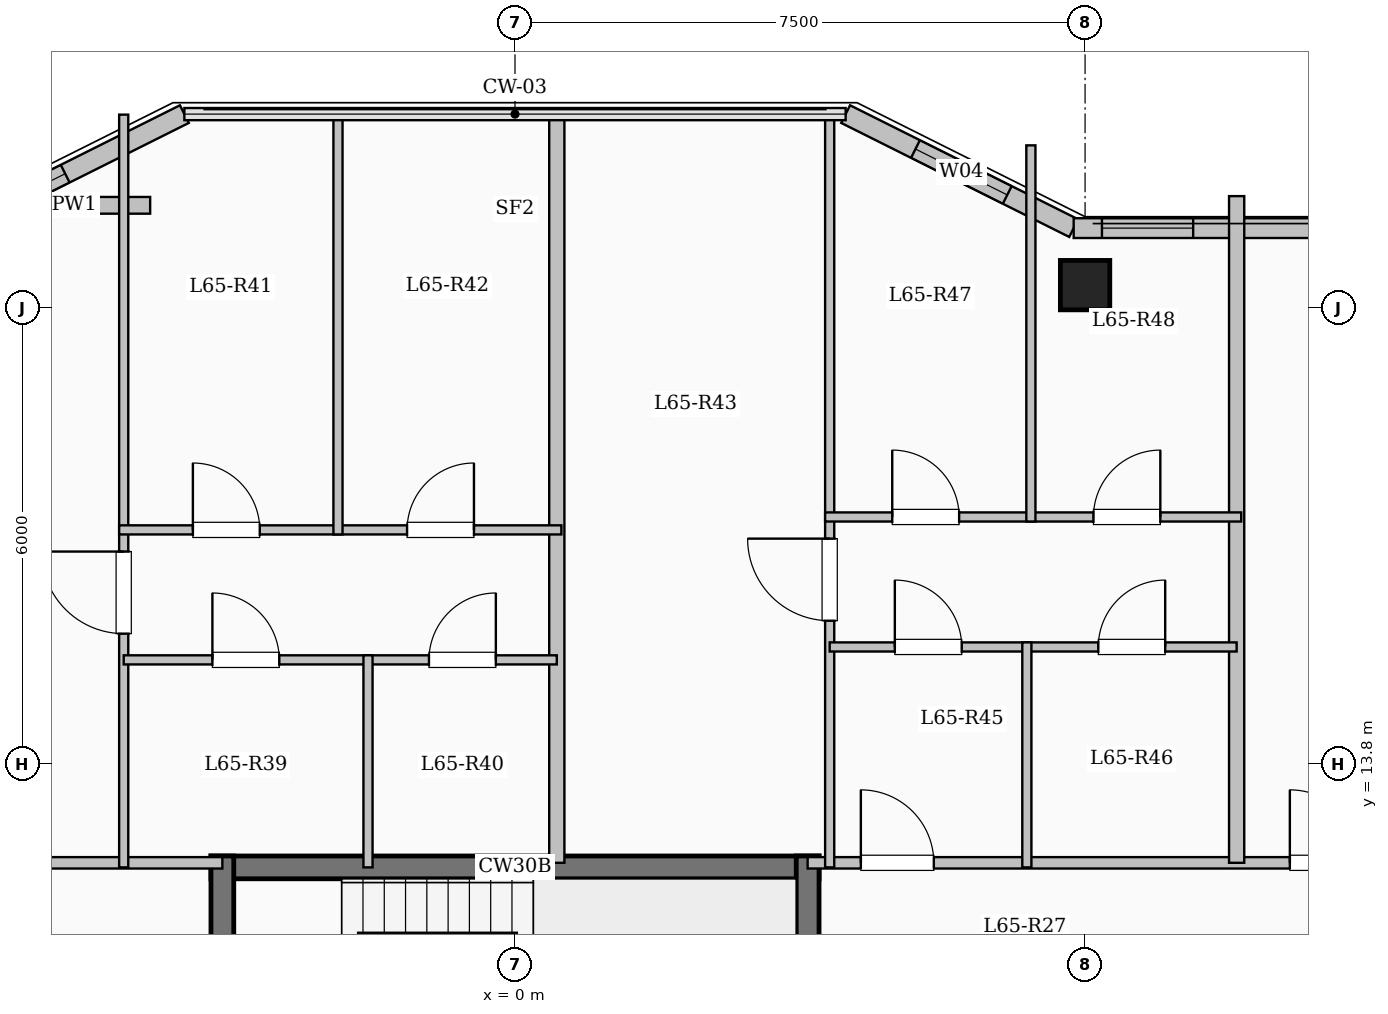
"""IFC4 building model, lengths in metres.
Left out: names, types, materials, properties, quantities, classifications, styles, units other than length and angle.
Written with IfcOpenShell. Run it as: python <this file> out.ifc"""

import sys

from ifc_helpers import new_model, si_unit, direction, frame, frame_2d, origin, origin_2d, place, context, subcontext, project, spatial, rectangle, extrude, element, fill, save


model = new_model("IFC4")
c1 = context("Model", 3, precision=1e-05, world=origin(), true_north=direction((0.0, 1.0)))
c2 = subcontext(c1, "Body", "Model", "MODEL_VIEW")
j1 = project(units=[si_unit("LENGTHUNIT", "METRE"), si_unit("PLANEANGLEUNIT", "RADIAN")], contexts=[c1])
p1 = place(None, origin())
s1 = spatial("IfcSite", under=j1, at=p1, CompositionType="ELEMENT")
p2 = place(p1, origin())
s2 = spatial("IfcBuilding", under=s1, at=p2, CompositionType="ELEMENT")
p3 = place(p2, frame((0.0, 0.0, 241.5)))
s3 = spatial("IfcBuildingStorey", under=s2, at=p3, CompositionType="ELEMENT", Elevation=241.5)
p4 = place(p3, frame((7.5, 20.1, 0.0), z_axis=(0.0, 0.0, 1.0), x_axis=(1.0, 0.0, 0.0)))
e1 = element("IfcColumn", 1, at=p4, inside=s3, PredefinedType="COLUMN", context=c2, shape_type="SweptSolid", body=[
    extrude(rectangle(XDim=0.65, YDim=0.65, at=origin_2d()), origin(), (0.0, 0.0, 1.0), 3.35),
])
p5 = place(p3, frame((-7.35, 20.85, 0.0), z_axis=(0.0, 0.0, 1.0), x_axis=(0.894427191, 0.4472135955, 0.0)))
e2 = element("IfcWall", 2, at=p5, inside=s3, PredefinedType="SOLIDWALL", context=c2, shape_type="SweptSolid", body=[
    extrude(rectangle(XDim=3.354, YDim=0.26, at=frame_2d((1.677, 0.0))), origin(), (0.0, 0.0, 1.0), 3.1),
])
p6 = place(p5, frame((0.401, 0.0, 0.95)))
e3 = element("IfcOpeningElement", 3, at=p6, cuts=e2, PredefinedType="OPENING", context=c2, shape_type="SweptSolid", body=[
    extrude(rectangle(XDim=1.2, YDim=1.5, at=frame_2d((0.6, 0.75))), frame((0.0, 0.14, 0.0), z_axis=(0.0, -1.0, 0.0), x_axis=(1.0, 0.0, 0.0)), (0.0, 0.0, 1.0), 0.28),
])
p7 = place(p3, frame((4.35, 22.35, 0.0), z_axis=(0.0, 0.0, 1.0), x_axis=(0.894427191, -0.4472135955, 0.0)))
e4 = element("IfcWall", 4, at=p7, inside=s3, PredefinedType="SOLIDWALL", context=c2, shape_type="SweptSolid", body=[
    extrude(rectangle(XDim=3.354, YDim=0.26, at=frame_2d((1.677, 0.0))), origin(), (0.0, 0.0, 1.0), 3.1),
])
p8 = place(p7, frame((1.027, 0.0, 0.95)))
e5 = element("IfcOpeningElement", 5, at=p8, cuts=e4, PredefinedType="OPENING", context=c2, shape_type="SweptSolid", body=[
    extrude(rectangle(XDim=1.35, YDim=1.55, at=frame_2d((0.675, 0.775))), frame((0.0, 0.14, 0.0), z_axis=(0.0, -1.0, 0.0), x_axis=(1.0, 0.0, 0.0)), (0.0, 0.0, 1.0), 0.28),
])
p9 = place(p3, frame((7.35, 20.85, 0.0), z_axis=(0.0, 0.0, 1.0), x_axis=(1.0, 0.0, 0.0)))
e6 = element("IfcWall", 6, at=p9, inside=s3, PredefinedType="SOLIDWALL", context=c2, shape_type="SweptSolid", body=[
    extrude(rectangle(XDim=10.5, YDim=0.26, at=frame_2d((5.25, 0.0))), origin(), (0.0, 0.0, 1.0), 3.1),
])
p10 = place(p9, frame((0.372, 0.0, 0.95)))
e7 = element("IfcOpeningElement", 7, at=p10, cuts=e6, PredefinedType="OPENING", context=c2, shape_type="SweptSolid", body=[
    extrude(rectangle(XDim=1.2, YDim=1.5, at=frame_2d((0.6, 0.75))), frame((0.0, 0.14, 0.0), z_axis=(0.0, -1.0, 0.0), x_axis=(1.0, 0.0, 0.0)), (0.0, 0.0, 1.0), 0.28),
])
p11 = place(p9, frame((3.1, 0.0, 0.9)))
e8 = element("IfcOpeningElement", 8, at=p11, cuts=e6, PredefinedType="OPENING", context=c2, shape_type="SweptSolid", body=[
    extrude(rectangle(XDim=2.2, YDim=1.75, at=frame_2d((1.1, 0.875))), frame((0.0, 0.14, 0.0), z_axis=(0.0, -1.0, 0.0), x_axis=(1.0, 0.0, 0.0)), (0.0, 0.0, 1.0), 0.28),
])
p12 = place(p9, frame((7.525, 0.0, 0.9)))
e9 = element("IfcOpeningElement", 9, at=p12, cuts=e6, PredefinedType="OPENING", context=c2, shape_type="SweptSolid", body=[
    extrude(rectangle(XDim=1.65, YDim=1.6, at=frame_2d((0.825, 0.8))), frame((0.0, 0.14, 0.0), z_axis=(0.0, -1.0, 0.0), x_axis=(1.0, 0.0, 0.0)), (0.0, 0.0, 1.0), 0.28),
])
p13 = place(p3, frame((-6.8, 21.15, 0.0), z_axis=(0.0, 0.0, 1.0), x_axis=(1.0, 0.0, 0.0)))
e10 = element("IfcWall", 10, at=p13, inside=s3, PredefinedType="PARAPET", context=c2, shape_type="SweptSolid", body=[
    extrude(rectangle(XDim=2.0, YDim=0.22, at=frame_2d((1.0, 0.0))), origin(), (0.0, 0.0, 1.0), 0.85),
])
p14 = place(p3, frame((-4.0, 12.44, 0.0), z_axis=(0.0, 0.0, 1.0), x_axis=(1.0, 0.0, 0.0)))
e11 = element("IfcWall", 11, at=p14, inside=s3, PredefinedType="SHEAR", context=c2, shape_type="SweptSolid", body=[
    extrude(rectangle(XDim=8.0, YDim=0.3, at=frame_2d((4.0, 0.0))), origin(), (0.0, 0.0, 1.0), 3.35),
])
for number, where, z_axis, x_axis in (
    (12, (-3.85, 9.0, 0.0), (0.0, 0.0, 1.0), (0.0, 1.0, 0.0)),
    (13, (3.85, 9.0, 0.0), (0.0, 0.0, 1.0), (0.0, 1.0, 0.0)),
):
    element("IfcWall", number, at=place(p3, frame(where, z_axis=z_axis, x_axis=x_axis)), inside=s3, PredefinedType="SHEAR", context=c2, shape_type="SweptSolid", body=[
        extrude(rectangle(XDim=3.59, YDim=0.3, at=frame_2d((1.795, 0.0))), origin(), (0.0, 0.0, 1.0), 3.35),
    ])
p15 = place(p3, frame((-17.75, 12.5, 0.0), z_axis=(0.0, 0.0, 1.0), x_axis=(1.0, 0.0, 0.0)))
e14 = element("IfcWall", 14, at=p15, inside=s3, PredefinedType="PARTITIONING", context=c2, shape_type="SweptSolid", body=[
    extrude(rectangle(XDim=13.9, YDim=0.15, at=frame_2d((6.95, 0.0))), origin(), (0.0, 0.0, 1.0), 3.1),
])
p16 = place(p15, frame((0.7, 0.0, 0.0)))
e15 = element("IfcOpeningElement", 15, at=p16, cuts=e14, PredefinedType="OPENING", context=c2, shape_type="SweptSolid", body=[
    extrude(rectangle(XDim=0.96, YDim=2.15, at=frame_2d((0.48, 1.075))), frame((0.0, 0.085, 0.0), z_axis=(0.0, -1.0, 0.0), x_axis=(1.0, 0.0, 0.0)), (0.0, 0.0, 1.0), 0.17),
])
p17 = place(p15, frame((9.484, 0.0, 0.0)))
e16 = element("IfcOpeningElement", 16, at=p17, cuts=e14, PredefinedType="OPENING", context=c2, shape_type="SweptSolid", body=[
    extrude(rectangle(XDim=0.96, YDim=2.15, at=frame_2d((0.48, 1.075))), frame((0.0, 0.085, 0.0), z_axis=(0.0, -1.0, 0.0), x_axis=(1.0, 0.0, 0.0)), (0.0, 0.0, 1.0), 0.17),
])
p18 = place(p3, frame((3.85, 12.5, 0.0), z_axis=(0.0, 0.0, 1.0), x_axis=(1.0, 0.0, 0.0)))
e17 = element("IfcWall", 17, at=p18, inside=s3, PredefinedType="PARTITIONING", context=c2, shape_type="SweptSolid", body=[
    extrude(rectangle(XDim=13.9, YDim=0.15, at=frame_2d((6.95, 0.0))), origin(), (0.0, 0.0, 1.0), 3.1),
])
p19 = place(p18, frame((0.7, 0.0, 0.0)))
e18 = element("IfcOpeningElement", 18, at=p19, cuts=e17, PredefinedType="OPENING", context=c2, shape_type="SweptSolid", body=[
    extrude(rectangle(XDim=0.96, YDim=2.15, at=frame_2d((0.48, 1.075))), frame((0.0, 0.085, 0.0), z_axis=(0.0, -1.0, 0.0), x_axis=(1.0, 0.0, 0.0)), (0.0, 0.0, 1.0), 0.17),
])
p20 = place(p18, frame((6.344, 0.0, 0.0)))
e19 = element("IfcOpeningElement", 19, at=p20, cuts=e17, PredefinedType="OPENING", context=c2, shape_type="SweptSolid", body=[
    extrude(rectangle(XDim=0.96, YDim=2.15, at=frame_2d((0.48, 1.075))), frame((0.0, 0.085, 0.0), z_axis=(0.0, -1.0, 0.0), x_axis=(1.0, 0.0, 0.0)), (0.0, 0.0, 1.0), 0.17),
])
p21 = place(p3, frame((0.55, 12.5, 0.0), z_axis=(0.0, 0.0, 1.0), x_axis=(0.0, 1.0, 0.0)))
e20 = element("IfcWall", 20, at=p21, inside=s3, PredefinedType="SOLIDWALL", context=c2, shape_type="SweptSolid", body=[
    extrude(rectangle(XDim=9.88, YDim=0.2, at=frame_2d((4.94, 0.0))), origin(), (0.0, 0.0, 1.0), 3.1),
])
p22 = place(p3, frame((-5.148, 12.44, 0.0), z_axis=(0.0, 0.0, 1.0), x_axis=(0.0, 1.0, 0.0)))
e21 = element("IfcWall", 21, at=p22, inside=s3, PredefinedType="PARTITIONING", context=c2, shape_type="SweptSolid", body=[
    extrude(rectangle(XDim=9.903, YDim=0.12, at=frame_2d((4.952, 0.0))), origin(), (0.0, 0.0, 1.0), 3.1),
])
p23 = place(p22, frame((3.075, 0.0, 0.0)))
e22 = element("IfcOpeningElement", 22, at=p23, cuts=e21, PredefinedType="OPENING", context=c2, shape_type="SweptSolid", body=[
    extrude(rectangle(XDim=1.08, YDim=2.15, at=frame_2d((0.54, 1.075))), frame((0.0, 0.07, 0.0), z_axis=(0.0, -1.0, 0.0), x_axis=(1.0, 0.0, 0.0)), (0.0, 0.0, 1.0), 0.14),
])
p24 = place(p3, frame((-5.148, 15.17, 0.0), z_axis=(0.0, 0.0, 1.0), x_axis=(1.0, 0.0, 0.0)))
e23 = element("IfcWall", 23, at=p24, inside=s3, PredefinedType="PARTITIONING", context=c2, shape_type="SweptSolid", body=[
    extrude(rectangle(XDim=3.214, YDim=0.12, at=frame_2d((1.607, 0.0))), origin(), (0.0, 0.0, 1.0), 3.1),
])
p25 = place(p24, frame((1.167, 0.0, 0.0)))
e24 = element("IfcOpeningElement", 24, at=p25, cuts=e23, PredefinedType="OPENING", context=c2, shape_type="SweptSolid", body=[
    extrude(rectangle(XDim=0.88, YDim=2.1, at=frame_2d((0.44, 1.05))), frame((0.0, 0.07, 0.0), z_axis=(0.0, -1.0, 0.0), x_axis=(1.0, 0.0, 0.0)), (0.0, 0.0, 1.0), 0.14),
])
p26 = place(p3, frame((-1.934, 15.17, 0.0), z_axis=(0.0, 0.0, 1.0), x_axis=(1.0, 0.0, 0.0)))
e25 = element("IfcWall", 25, at=p26, inside=s3, PredefinedType="PARTITIONING", context=c2, shape_type="SweptSolid", body=[
    extrude(rectangle(XDim=2.484, YDim=0.12, at=frame_2d((1.242, 0.0))), origin(), (0.0, 0.0, 1.0), 3.1),
])
p27 = place(p26, frame((0.802, 0.0, 0.0)))
e26 = element("IfcOpeningElement", 26, at=p27, cuts=e25, PredefinedType="OPENING", context=c2, shape_type="SweptSolid", body=[
    extrude(rectangle(XDim=0.88, YDim=2.1, at=frame_2d((0.44, 1.05))), frame((0.0, 0.07, 0.0), z_axis=(0.0, -1.0, 0.0), x_axis=(1.0, 0.0, 0.0)), (0.0, 0.0, 1.0), 0.14),
])
p28 = place(p3, frame((-5.208, 16.88, 0.0), z_axis=(0.0, 0.0, 1.0), x_axis=(1.0, 0.0, 0.0)))
e27 = element("IfcWall", 27, at=p28, inside=s3, PredefinedType="PARTITIONING", context=c2, shape_type="SweptSolid", body=[
    extrude(rectangle(XDim=5.818, YDim=0.12, at=frame_2d((2.909, 0.0))), origin(), (0.0, 0.0, 1.0), 2.785),
])
p29 = place(p28, frame((0.97, 0.0, 0.0)))
e28 = element("IfcOpeningElement", 28, at=p29, cuts=e27, PredefinedType="OPENING", context=c2, shape_type="SweptSolid", body=[
    extrude(rectangle(XDim=0.88, YDim=2.1, at=frame_2d((0.44, 1.05))), frame((0.0, 0.07, 0.0), z_axis=(0.0, -1.0, 0.0), x_axis=(1.0, 0.0, 0.0)), (0.0, 0.0, 1.0), 0.14),
])
p30 = place(p28, frame((3.788, 0.0, 0.0)))
e29 = element("IfcOpeningElement", 29, at=p30, cuts=e27, PredefinedType="OPENING", context=c2, shape_type="SweptSolid", body=[
    extrude(rectangle(XDim=0.88, YDim=2.1, at=frame_2d((0.44, 1.05))), frame((0.0, 0.07, 0.0), z_axis=(0.0, -1.0, 0.0), x_axis=(1.0, 0.0, 0.0)), (0.0, 0.0, 1.0), 0.14),
])
p31 = place(p3, frame((-1.934, 12.44, 0.0), z_axis=(0.0, 0.0, 1.0), x_axis=(0.0, 1.0, 0.0)))
e30 = element("IfcWall", 30, at=p31, inside=s3, PredefinedType="PARTITIONING", context=c2, shape_type="SweptSolid", body=[
    extrude(rectangle(XDim=2.79, YDim=0.12, at=frame_2d((1.395, 0.0))), origin(), (0.0, 0.0, 1.0), 3.1),
])
p32 = place(p3, frame((-2.329, 16.82, 0.0), z_axis=(0.0, 0.0, 1.0), x_axis=(0.0, 1.0, 0.0)))
e31 = element("IfcWall", 31, at=p32, inside=s3, PredefinedType="PARTITIONING", context=c2, shape_type="SweptSolid", body=[
    extrude(rectangle(XDim=5.56, YDim=0.12, at=frame_2d((2.78, 0.0))), origin(), (0.0, 0.0, 1.0), 3.1),
])
p33 = place(p3, frame((9.494, 12.5, 0.0), z_axis=(0.0, 0.0, 1.0), x_axis=(0.0, 1.0, 0.0)))
e32 = element("IfcWall", 32, at=p33, inside=s3, PredefinedType="SOLIDWALL", context=c2, shape_type="SweptSolid", body=[
    extrude(rectangle(XDim=8.771, YDim=0.2, at=frame_2d((4.385, 0.0))), origin(), (0.0, 0.0, 1.0), 3.1),
])
p34 = place(p3, frame((4.14, 12.44, 0.0), z_axis=(0.0, 0.0, 1.0), x_axis=(0.0, 1.0, 0.0)))
e33 = element("IfcWall", 33, at=p34, inside=s3, PredefinedType="PARTITIONING", context=c2, shape_type="SweptSolid", body=[
    extrude(rectangle(XDim=9.94, YDim=0.12, at=frame_2d((4.97, 0.0))), origin(), (0.0, 0.0, 1.0), 3.1),
])
p35 = place(p34, frame((3.245, 0.0, 0.0)))
e34 = element("IfcOpeningElement", 34, at=p35, cuts=e33, PredefinedType="OPENING", context=c2, shape_type="SweptSolid", body=[
    extrude(rectangle(XDim=1.08, YDim=2.15, at=frame_2d((0.54, 1.075))), frame((0.0, 0.07, 0.0), z_axis=(0.0, -1.0, 0.0), x_axis=(1.0, 0.0, 0.0)), (0.0, 0.0, 1.0), 0.14),
])
p36 = place(p3, frame((4.14, 15.34, 0.0), z_axis=(0.0, 0.0, 1.0), x_axis=(1.0, 0.0, 0.0)))
e35 = element("IfcWall", 35, at=p36, inside=s3, PredefinedType="PARTITIONING", context=c2, shape_type="SweptSolid", body=[
    extrude(rectangle(XDim=2.594, YDim=0.12, at=frame_2d((1.297, 0.0))), origin(), (0.0, 0.0, 1.0), 2.785),
])
p37 = place(p36, frame((0.857, 0.0, 0.0)))
e36 = element("IfcOpeningElement", 36, at=p37, cuts=e35, PredefinedType="OPENING", context=c2, shape_type="SweptSolid", body=[
    extrude(rectangle(XDim=0.88, YDim=2.1, at=frame_2d((0.44, 1.05))), frame((0.0, 0.07, 0.0), z_axis=(0.0, -1.0, 0.0), x_axis=(1.0, 0.0, 0.0)), (0.0, 0.0, 1.0), 0.14),
])
p38 = place(p3, frame((6.734, 15.34, 0.0), z_axis=(0.0, 0.0, 1.0), x_axis=(1.0, 0.0, 0.0)))
e37 = element("IfcWall", 37, at=p38, inside=s3, PredefinedType="PARTITIONING", context=c2, shape_type="SweptSolid", body=[
    extrude(rectangle(XDim=2.76, YDim=0.12, at=frame_2d((1.38, 0.0))), origin(), (0.0, 0.0, 1.0), 2.785),
])
p39 = place(p38, frame((0.94, 0.0, 0.0)))
e38 = element("IfcOpeningElement", 38, at=p39, cuts=e37, PredefinedType="OPENING", context=c2, shape_type="SweptSolid", body=[
    extrude(rectangle(XDim=0.88, YDim=2.1, at=frame_2d((0.44, 1.05))), frame((0.0, 0.07, 0.0), z_axis=(0.0, -1.0, 0.0), x_axis=(1.0, 0.0, 0.0)), (0.0, 0.0, 1.0), 0.14),
])
p40 = place(p3, frame((4.08, 17.05, 0.0), z_axis=(0.0, 0.0, 1.0), x_axis=(1.0, 0.0, 0.0)))
e39 = element("IfcWall", 39, at=p40, inside=s3, PredefinedType="PARTITIONING", context=c2, shape_type="SweptSolid", body=[
    extrude(rectangle(XDim=5.474, YDim=0.12, at=frame_2d((2.737, 0.0))), origin(), (0.0, 0.0, 1.0), 2.785),
])
p41 = place(p40, frame((0.883, 0.0, 0.0)))
e40 = element("IfcOpeningElement", 40, at=p41, cuts=e39, PredefinedType="OPENING", context=c2, shape_type="SweptSolid", body=[
    extrude(rectangle(XDim=0.88, YDim=2.1, at=frame_2d((0.44, 1.05))), frame((0.0, 0.07, 0.0), z_axis=(0.0, -1.0, 0.0), x_axis=(1.0, 0.0, 0.0)), (0.0, 0.0, 1.0), 0.14),
])
p42 = place(p40, frame((3.53, 0.0, 0.0)))
e41 = element("IfcOpeningElement", 41, at=p42, cuts=e39, PredefinedType="OPENING", context=c2, shape_type="SweptSolid", body=[
    extrude(rectangle(XDim=0.88, YDim=2.1, at=frame_2d((0.44, 1.05))), frame((0.0, 0.07, 0.0), z_axis=(0.0, -1.0, 0.0), x_axis=(1.0, 0.0, 0.0)), (0.0, 0.0, 1.0), 0.14),
])
p43 = place(p3, frame((6.734, 12.44, 0.0), z_axis=(0.0, 0.0, 1.0), x_axis=(0.0, 1.0, 0.0)))
e42 = element("IfcWall", 42, at=p43, inside=s3, PredefinedType="PARTITIONING", context=c2, shape_type="SweptSolid", body=[
    extrude(rectangle(XDim=2.96, YDim=0.12, at=frame_2d((1.48, 0.0))), origin(), (0.0, 0.0, 1.0), 3.1),
])
p44 = place(p3, frame((6.787, 16.99, 0.0), z_axis=(0.0, 0.0, 1.0), x_axis=(0.0, 1.0, 0.0)))
e43 = element("IfcWall", 43, at=p44, inside=s3, PredefinedType="PARTITIONING", context=c2, shape_type="SweptSolid", body=[
    extrude(rectangle(XDim=4.949, YDim=0.12, at=frame_2d((2.475, 0.0))), origin(), (0.0, 0.0, 1.0), 3.1),
])
p45 = place(p6, origin())
e44 = element("IfcWindow", 44, at=p45, inside=s3, PartitioningType="SINGLE_PANEL", PredefinedType="WINDOW", context=c2, shape_type="SweptSolid", body=[
    extrude(rectangle(XDim=1.2, YDim=1.5, at=frame_2d((0.6, 0.75))), frame((0.0, 0.03, 0.0), z_axis=(0.0, -1.0, 0.0), x_axis=(1.0, 0.0, 0.0)), (0.0, 0.0, 1.0), 0.06),
])
fill(e3, e44)
p46 = place(p8, origin())
e45 = element("IfcWindow", 45, at=p46, inside=s3, PartitioningType="SINGLE_PANEL", PredefinedType="WINDOW", context=c2, shape_type="SweptSolid", body=[
    extrude(rectangle(XDim=1.35, YDim=1.55, at=frame_2d((0.675, 0.775))), frame((0.0, 0.03, 0.0), z_axis=(0.0, -1.0, 0.0), x_axis=(1.0, 0.0, 0.0)), (0.0, 0.0, 1.0), 0.06),
])
fill(e5, e45)
p47 = place(p10, origin())
e46 = element("IfcWindow", 46, at=p47, inside=s3, PartitioningType="SINGLE_PANEL", PredefinedType="WINDOW", context=c2, shape_type="SweptSolid", body=[
    extrude(rectangle(XDim=1.2, YDim=1.5, at=frame_2d((0.6, 0.75))), frame((0.0, 0.03, 0.0), z_axis=(0.0, -1.0, 0.0), x_axis=(1.0, 0.0, 0.0)), (0.0, 0.0, 1.0), 0.06),
])
fill(e7, e46)
p48 = place(p23, origin())
e47 = element("IfcDoor", 47, at=p48, inside=s3, OperationType="SINGLE_SWING_RIGHT", PredefinedType="DOOR", context=c2, shape_type="SweptSolid", body=[
    extrude(rectangle(XDim=1.08, YDim=2.15, at=frame_2d((0.54, 1.075))), frame((0.0, 0.025, 0.0), z_axis=(0.0, -1.0, 0.0), x_axis=(1.0, 0.0, 0.0)), (0.0, 0.0, 1.0), 0.05),
])
fill(e22, e47)
p49 = place(p25, origin())
e48 = element("IfcDoor", 48, at=p49, inside=s3, OperationType="SINGLE_SWING_LEFT", PredefinedType="DOOR", context=c2, shape_type="SweptSolid", body=[
    extrude(rectangle(XDim=0.88, YDim=2.1, at=frame_2d((0.44, 1.05))), frame((0.0, 0.025, 0.0), z_axis=(0.0, -1.0, 0.0), x_axis=(1.0, 0.0, 0.0)), (0.0, 0.0, 1.0), 0.05),
])
fill(e24, e48)
p50 = place(p27, origin())
e49 = element("IfcDoor", 49, at=p50, inside=s3, OperationType="SINGLE_SWING_RIGHT", PredefinedType="DOOR", context=c2, shape_type="SweptSolid", body=[
    extrude(rectangle(XDim=0.88, YDim=2.1, at=frame_2d((0.44, 1.05))), frame((0.0, 0.025, 0.0), z_axis=(0.0, -1.0, 0.0), x_axis=(1.0, 0.0, 0.0)), (0.0, 0.0, 1.0), 0.05),
])
fill(e26, e49)
p51 = place(p29, origin())
e50 = element("IfcDoor", 50, at=p51, inside=s3, OperationType="SINGLE_SWING_LEFT", PredefinedType="DOOR", context=c2, shape_type="SweptSolid", body=[
    extrude(rectangle(XDim=0.88, YDim=2.1, at=frame_2d((0.44, 1.05))), frame((0.0, 0.025, 0.0), z_axis=(0.0, -1.0, 0.0), x_axis=(1.0, 0.0, 0.0)), (0.0, 0.0, 1.0), 0.05),
])
fill(e28, e50)
p52 = place(p30, origin())
e51 = element("IfcDoor", 51, at=p52, inside=s3, OperationType="SINGLE_SWING_RIGHT", PredefinedType="DOOR", context=c2, shape_type="SweptSolid", body=[
    extrude(rectangle(XDim=0.88, YDim=2.1, at=frame_2d((0.44, 1.05))), frame((0.0, 0.025, 0.0), z_axis=(0.0, -1.0, 0.0), x_axis=(1.0, 0.0, 0.0)), (0.0, 0.0, 1.0), 0.05),
])
fill(e29, e51)
p53 = place(p19, origin())
e52 = element("IfcDoor", 52, at=p53, inside=s3, OperationType="SINGLE_SWING_LEFT", PredefinedType="DOOR", context=c2, shape_type="SweptSolid", body=[
    extrude(rectangle(XDim=0.96, YDim=2.15, at=frame_2d((0.48, 1.075))), frame((0.0, 0.025, 0.0), z_axis=(0.0, -1.0, 0.0), x_axis=(1.0, 0.0, 0.0)), (0.0, 0.0, 1.0), 0.05),
])
fill(e18, e52)
p54 = place(p35, origin())
e53 = element("IfcDoor", 53, at=p54, inside=s3, OperationType="SINGLE_SWING_RIGHT", PredefinedType="DOOR", context=c2, shape_type="SweptSolid", body=[
    extrude(rectangle(XDim=1.08, YDim=2.15, at=frame_2d((0.54, 1.075))), frame((0.0, 0.025, 0.0), z_axis=(0.0, -1.0, 0.0), x_axis=(1.0, 0.0, 0.0)), (0.0, 0.0, 1.0), 0.05),
])
fill(e34, e53)
p55 = place(p37, origin())
e54 = element("IfcDoor", 54, at=p55, inside=s3, OperationType="SINGLE_SWING_LEFT", PredefinedType="DOOR", context=c2, shape_type="SweptSolid", body=[
    extrude(rectangle(XDim=0.88, YDim=2.1, at=frame_2d((0.44, 1.05))), frame((0.0, 0.025, 0.0), z_axis=(0.0, -1.0, 0.0), x_axis=(1.0, 0.0, 0.0)), (0.0, 0.0, 1.0), 0.05),
])
fill(e36, e54)
p56 = place(p39, origin())
e55 = element("IfcDoor", 55, at=p56, inside=s3, OperationType="SINGLE_SWING_RIGHT", PredefinedType="DOOR", context=c2, shape_type="SweptSolid", body=[
    extrude(rectangle(XDim=0.88, YDim=2.1, at=frame_2d((0.44, 1.05))), frame((0.0, 0.025, 0.0), z_axis=(0.0, -1.0, 0.0), x_axis=(1.0, 0.0, 0.0)), (0.0, 0.0, 1.0), 0.05),
])
fill(e38, e55)
p57 = place(p41, origin())
e56 = element("IfcDoor", 56, at=p57, inside=s3, OperationType="SINGLE_SWING_LEFT", PredefinedType="DOOR", context=c2, shape_type="SweptSolid", body=[
    extrude(rectangle(XDim=0.88, YDim=2.1, at=frame_2d((0.44, 1.05))), frame((0.0, 0.025, 0.0), z_axis=(0.0, -1.0, 0.0), x_axis=(1.0, 0.0, 0.0)), (0.0, 0.0, 1.0), 0.05),
])
fill(e40, e56)
p58 = place(p42, origin())
e57 = element("IfcDoor", 57, at=p58, inside=s3, OperationType="SINGLE_SWING_RIGHT", PredefinedType="DOOR", context=c2, shape_type="SweptSolid", body=[
    extrude(rectangle(XDim=0.88, YDim=2.1, at=frame_2d((0.44, 1.05))), frame((0.0, 0.025, 0.0), z_axis=(0.0, -1.0, 0.0), x_axis=(1.0, 0.0, 0.0)), (0.0, 0.0, 1.0), 0.05),
])
fill(e41, e57)
p59 = place(p20, origin())
e58 = element("IfcDoor", 58, at=p59, inside=s3, OperationType="SINGLE_SWING_LEFT", PredefinedType="DOOR", context=c2, shape_type="SweptSolid", body=[
    extrude(rectangle(XDim=0.96, YDim=2.15, at=frame_2d((0.48, 1.075))), frame((0.0, 0.025, 0.0), z_axis=(0.0, -1.0, 0.0), x_axis=(1.0, 0.0, 0.0)), (0.0, 0.0, 1.0), 0.05),
])
fill(e19, e58)
save(model, sys.argv[1])
